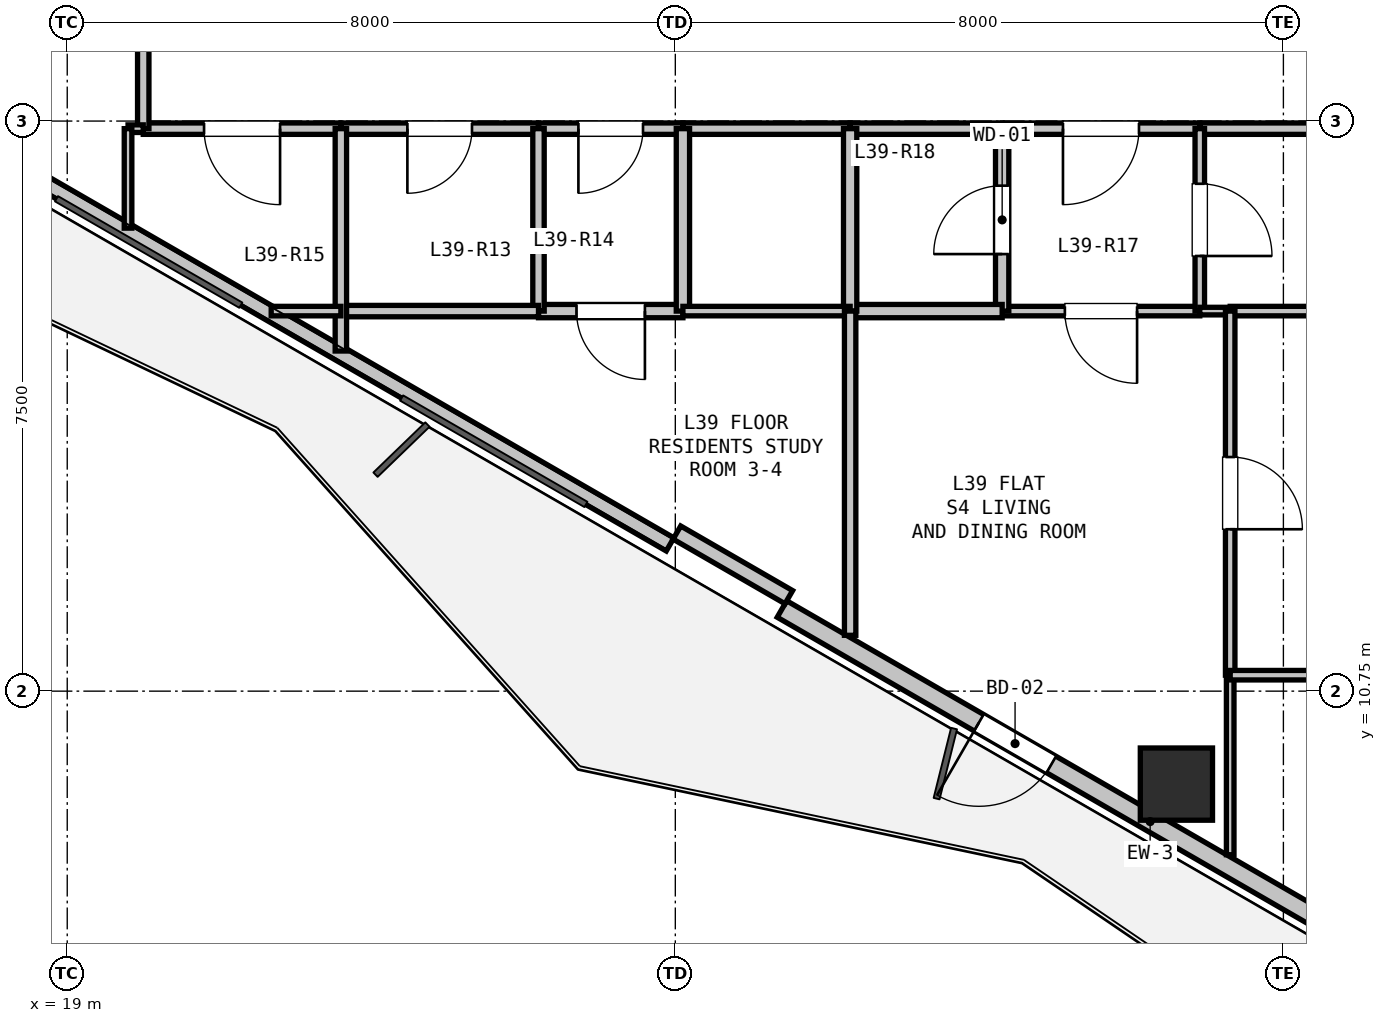
"""IFC4 building model, lengths in metres.
Left out: names, types, materials, properties, quantities, classifications, styles, units other than length and angle.
Written with IfcOpenShell. Run it as: python <this file> out.ifc"""

import sys

from ifc_helpers import new_model, si_unit, direction, frame, frame_2d, origin, origin_2d, place, context, subcontext, project, spatial, rectangle, hollow_rectangle, extrude, element, fill, save


model = new_model("IFC4")
c1 = context("Model", 3, precision=1e-05, world=origin(), true_north=direction((0.0, 1.0)))
c2 = subcontext(c1, "Body", "Model", "MODEL_VIEW")
j1 = project(units=[si_unit("LENGTHUNIT", "METRE"), si_unit("PLANEANGLEUNIT", "RADIAN")], contexts=[c1])
p1 = place(None, origin())
s1 = spatial("IfcSite", under=j1, at=p1, CompositionType="ELEMENT")
p2 = place(p1, origin())
s2 = spatial("IfcBuilding", under=s1, at=p2, CompositionType="ELEMENT")
p3 = place(p2, frame((0.0, 0.0, 141.0)))
s3 = spatial("IfcBuildingStorey", under=s2, at=p3, CompositionType="ELEMENT", Elevation=141.0)
p4 = place(p3, frame((33.593, 9.527, 0.0), z_axis=(0.0, 0.0, 1.0), x_axis=(1.0, 0.0, 0.0)))
e1 = element("IfcColumn", 1, at=p4, inside=s3, PredefinedType="COLUMN", context=c2, shape_type="SweptSolid", body=[
    extrude(hollow_rectangle(XDim=0.95, YDim=0.95, WallThickness=0.028, at=origin_2d()), origin(), (0.0, 0.0, 1.0), 3.3),
])
p5 = place(p3, frame((38.091, 6.237, 0.0), z_axis=(0.0, 0.0, 1.0), x_axis=(-0.86602239209, 0.500005216371, 0.0)))
e2 = element("IfcWall", 2, at=p5, inside=s3, PredefinedType="SOLIDWALL", context=c2, shape_type="SweptSolid", body=[
    extrude(rectangle(XDim=11.186, YDim=0.25, at=frame_2d((5.593, 0.0))), origin(), (0.0, 0.0, 1.0), 2.68),
])
p6 = place(p5, frame((7.095, 0.0, 0.0)))
e3 = element("IfcOpeningElement", 3, at=p6, cuts=e2, PredefinedType="OPENING", context=c2, shape_type="SweptSolid", body=[
    extrude(rectangle(XDim=1.1, YDim=2.1, at=frame_2d((0.55, 1.05))), frame((0.0, 0.135, 0.0), z_axis=(0.0, -1.0, 0.0), x_axis=(1.0, 0.0, 0.0)), (0.0, 0.0, 1.0), 0.27),
])
p7 = place(p5, frame((1.718, 0.0, 0.9)))
e4 = element("IfcOpeningElement", 4, at=p7, cuts=e2, PredefinedType="OPENING", context=c2, shape_type="SweptSolid", body=[
    extrude(rectangle(XDim=1.2, YDim=1.4, at=frame_2d((0.6, 0.7))), frame((0.0, 0.135, 0.0), z_axis=(0.0, -1.0, 0.0), x_axis=(1.0, 0.0, 0.0)), (0.0, 0.0, 1.0), 0.27),
])
p8 = place(p3, frame((26.931, 12.68, 0.0), z_axis=(0.0, 0.0, 1.0), x_axis=(-0.866026619769, 0.499997893847, 0.0)))
e5 = element("IfcWall", 5, at=p8, inside=s3, PredefinedType="PARAPET", context=c2, shape_type="SweptSolid", body=[
    extrude(rectangle(XDim=10.486, YDim=0.2, at=frame_2d((5.243, 0.0))), origin(), (0.0, 0.0, 1.0), 0.2),
])
p9 = place(p3, frame((28.493, 11.986, 0.0), z_axis=(0.0, 0.0, 1.0), x_axis=(-0.86605165483, 0.499954529098, 0.0)))
e6 = element("IfcWall", 6, at=p9, inside=s3, PredefinedType="PARAPET", context=c2, shape_type="SweptSolid", body=[
    extrude(rectangle(XDim=1.7, YDim=0.2, at=frame_2d((0.85, 0.0))), origin(), (0.0, 0.0, 1.0), 2.68),
])
p10 = place(p3, frame((39.2, 18.15, 0.0), z_axis=(0.0, 0.0, 1.0), x_axis=(-1.0, 0.0, 0.0)))
e7 = element("IfcWall", 7, at=p10, inside=s3, PredefinedType="PARTITIONING", context=c2, shape_type="SweptSolid", body=[
    extrude(rectangle(XDim=5.3, YDim=0.15, at=frame_2d((2.65, 0.0))), origin(), (0.0, 0.0, 1.0), 2.433),
])
p11 = place(p3, frame((33.9, 18.15, 0.0), z_axis=(0.0, 0.0, 1.0), x_axis=(-1.0, 0.0, 0.0)))
e8 = element("IfcWall", 8, at=p11, inside=s3, PredefinedType="PARTITIONING", context=c2, shape_type="SweptSolid", body=[
    extrude(rectangle(XDim=2.6, YDim=0.15, at=frame_2d((1.3, 0.0))), origin(), (0.0, 0.0, 1.0), 3.06),
])
p12 = place(p11, frame((0.8, 0.0, 0.0)))
e9 = element("IfcOpeningElement", 9, at=p12, cuts=e8, PredefinedType="OPENING", context=c2, shape_type="SweptSolid", body=[
    extrude(rectangle(XDim=1.0, YDim=2.15, at=frame_2d((0.5, 1.075))), frame((0.0, 0.085, 0.0), z_axis=(0.0, -1.0, 0.0), x_axis=(1.0, 0.0, 0.0)), (0.0, 0.0, 1.0), 0.17),
])
p13 = place(p3, frame((31.3, 18.15, 0.0), z_axis=(0.0, 0.0, 1.0), x_axis=(-1.0, 0.0, 0.0)))
e10 = element("IfcWall", 10, at=p13, inside=s3, PredefinedType="PARTITIONING", context=c2, shape_type="SweptSolid", body=[
    extrude(rectangle(XDim=2.0, YDim=0.15, at=frame_2d((1.0, 0.0))), origin(), (0.0, 0.0, 1.0), 3.06),
])
p14 = place(p3, frame((29.3, 18.15, 0.0), z_axis=(0.0, 0.0, 1.0), x_axis=(-1.0, 0.0, 0.0)))
e11 = element("IfcWall", 11, at=p14, inside=s3, PredefinedType="PARTITIONING", context=c2, shape_type="SweptSolid", body=[
    extrude(rectangle(XDim=2.2, YDim=0.15, at=frame_2d((1.1, 0.0))), origin(), (0.0, 0.0, 1.0), 3.06),
])
p15 = place(p3, frame((27.1, 18.15, 0.0), z_axis=(0.0, 0.0, 1.0), x_axis=(-1.0, 0.0, 0.0)))
e12 = element("IfcWall", 12, at=p15, inside=s3, PredefinedType="PARTITIONING", context=c2, shape_type="SweptSolid", body=[
    extrude(rectangle(XDim=1.9, YDim=0.15, at=frame_2d((0.95, 0.0))), origin(), (0.0, 0.0, 1.0), 3.06),
])
p16 = place(p15, frame((0.525, 0.0, 0.0)))
e13 = element("IfcOpeningElement", 13, at=p16, cuts=e12, PredefinedType="OPENING", context=c2, shape_type="SweptSolid", body=[
    extrude(rectangle(XDim=0.85, YDim=2.1, at=frame_2d((0.425, 1.05))), frame((0.0, 0.085, 0.0), z_axis=(0.0, -1.0, 0.0), x_axis=(1.0, 0.0, 0.0)), (0.0, 0.0, 1.0), 0.17),
])
p17 = place(p3, frame((25.2, 18.15, 0.0), z_axis=(0.0, 0.0, 1.0), x_axis=(-1.0, 0.0, 0.0)))
e14 = element("IfcWall", 14, at=p17, inside=s3, PredefinedType="PARTITIONING", context=c2, shape_type="SweptSolid", body=[
    extrude(rectangle(XDim=2.6, YDim=0.15, at=frame_2d((1.3, 0.0))), origin(), (0.0, 0.0, 1.0), 2.433),
])
p18 = place(p17, frame((0.875, 0.0, 0.0)))
e15 = element("IfcOpeningElement", 15, at=p18, cuts=e14, PredefinedType="OPENING", context=c2, shape_type="SweptSolid", body=[
    extrude(rectangle(XDim=0.85, YDim=2.1, at=frame_2d((0.425, 1.05))), frame((0.0, 0.085, 0.0), z_axis=(0.0, -1.0, 0.0), x_axis=(1.0, 0.0, 0.0)), (0.0, 0.0, 1.0), 0.17),
])
p19 = place(p3, frame((22.6, 18.15, 0.0), z_axis=(0.0, 0.0, 1.0), x_axis=(-1.0, 0.0, 0.0)))
e16 = element("IfcWall", 16, at=p19, inside=s3, PredefinedType="PARTITIONING", context=c2, shape_type="SweptSolid", body=[
    extrude(rectangle(XDim=2.6, YDim=0.15, at=frame_2d((1.3, 0.0))), origin(), (0.0, 0.0, 1.0), 3.06),
])
p20 = place(p19, frame((0.8, 0.0, 0.0)))
e17 = element("IfcOpeningElement", 17, at=p20, cuts=e16, PredefinedType="OPENING", context=c2, shape_type="SweptSolid", body=[
    extrude(rectangle(XDim=1.0, YDim=2.15, at=frame_2d((0.5, 1.075))), frame((0.0, 0.085, 0.0), z_axis=(0.0, -1.0, 0.0), x_axis=(1.0, 0.0, 0.0)), (0.0, 0.0, 1.0), 0.17),
])
p21 = place(p3, frame((20.0, 18.15, 0.0), z_axis=(0.0, 0.0, 1.0), x_axis=(0.0, 1.0, 0.0)))
e18 = element("IfcWall", 18, at=p21, inside=s3, PredefinedType="PARTITIONING", context=c2, shape_type="SweptSolid", body=[
    extrude(rectangle(XDim=2.6, YDim=0.15, at=frame_2d((1.3, 0.0))), origin(), (0.0, 0.0, 1.0), 3.06),
])
p22 = place(p3, frame((33.9, 15.75, 0.0), z_axis=(0.0, 0.0, 1.0), x_axis=(-1.0, 0.0, 0.0)))
e19 = element("IfcWall", 19, at=p22, inside=s3, PredefinedType="PARTITIONING", context=c2, shape_type="SweptSolid", body=[
    extrude(rectangle(XDim=2.6, YDim=0.125, at=frame_2d((1.3, 0.0))), origin(), (0.0, 0.0, 1.0), 3.06),
])
p23 = place(p22, frame((0.825, 0.0, 0.0)))
e20 = element("IfcOpeningElement", 20, at=p23, cuts=e19, PredefinedType="OPENING", context=c2, shape_type="SweptSolid", body=[
    extrude(rectangle(XDim=0.95, YDim=2.1, at=frame_2d((0.475, 1.05))), frame((0.0, 0.073, 0.0), z_axis=(0.0, -1.0, 0.0), x_axis=(1.0, 0.0, 0.0)), (0.0, 0.0, 1.0), 0.145),
])
p24 = place(p3, frame((31.3, 15.75, 0.0), z_axis=(0.0, 0.0, 1.0), x_axis=(0.0, 1.0, 0.0)))
e21 = element("IfcWall", 21, at=p24, inside=s3, PredefinedType="PLUMBINGWALL", context=c2, shape_type="SweptSolid", body=[
    extrude(rectangle(XDim=2.4, YDim=0.175, at=frame_2d((1.2, 0.0))), origin(), (0.0, 0.0, 1.0), 3.06),
])
p25 = place(p24, frame((0.75, 0.0, 0.0)))
e22 = element("IfcOpeningElement", 22, at=p25, cuts=e21, PredefinedType="OPENING", context=c2, shape_type="SweptSolid", body=[
    extrude(rectangle(XDim=0.9, YDim=2.1, at=frame_2d((0.45, 1.05))), frame((0.0, 0.097, 0.0), z_axis=(0.0, -1.0, 0.0), x_axis=(1.0, 0.0, 0.0)), (0.0, 0.0, 1.0), 0.195),
])
p26 = place(p3, frame((33.9, 18.15, 0.0), z_axis=(0.0, 0.0, 1.0), x_axis=(0.0, -1.0, 0.0)))
e23 = element("IfcWall", 23, at=p26, inside=s3, PredefinedType="PARTITIONING", context=c2, shape_type="SweptSolid", body=[
    extrude(rectangle(XDim=2.4, YDim=0.125, at=frame_2d((1.2, 0.0))), origin(), (0.0, 0.0, 1.0), 3.06),
])
p27 = place(p26, frame((0.725, 0.0, 0.0)))
e24 = element("IfcOpeningElement", 24, at=p27, cuts=e23, PredefinedType="OPENING", context=c2, shape_type="SweptSolid", body=[
    extrude(rectangle(XDim=0.95, YDim=2.1, at=frame_2d((0.475, 1.05))), frame((0.0, 0.073, 0.0), z_axis=(0.0, -1.0, 0.0), x_axis=(1.0, 0.0, 0.0)), (0.0, 0.0, 1.0), 0.145),
])
p28 = place(p3, frame((27.1, 15.75, 0.0), z_axis=(0.0, 0.0, 1.0), x_axis=(-1.0, 0.0, 0.0)))
e25 = element("IfcWall", 25, at=p28, inside=s3, PredefinedType="PLUMBINGWALL", context=c2, shape_type="SweptSolid", body=[
    extrude(rectangle(XDim=1.9, YDim=0.175, at=frame_2d((0.95, 0.0))), origin(), (0.0, 0.0, 1.0), 2.433),
])
p29 = place(p28, frame((0.5, 0.0, 0.0)))
e26 = element("IfcOpeningElement", 26, at=p29, cuts=e25, PredefinedType="OPENING", context=c2, shape_type="SweptSolid", body=[
    extrude(rectangle(XDim=0.9, YDim=2.1, at=frame_2d((0.45, 1.05))), frame((0.0, 0.097, 0.0), z_axis=(0.0, -1.0, 0.0), x_axis=(1.0, 0.0, 0.0)), (0.0, 0.0, 1.0), 0.195),
])
p30 = place(p3, frame((25.2, 15.75, 0.0), z_axis=(0.0, 0.0, 1.0), x_axis=(0.0, 1.0, 0.0)))
e27 = element("IfcWall", 27, at=p30, inside=s3, PredefinedType="PARTITIONING", context=c2, shape_type="SweptSolid", body=[
    extrude(rectangle(XDim=2.4, YDim=0.15, at=frame_2d((1.2, 0.0))), origin(), (0.0, 0.0, 1.0), 2.433),
])
p31 = place(p3, frame((27.1, 18.15, 0.0), z_axis=(0.0, 0.0, 1.0), x_axis=(0.0, -1.0, 0.0)))
e28 = element("IfcWall", 28, at=p31, inside=s3, PredefinedType="PLUMBINGWALL", context=c2, shape_type="SweptSolid", body=[
    extrude(rectangle(XDim=2.4, YDim=0.175, at=frame_2d((1.2, 0.0))), origin(), (0.0, 0.0, 1.0), 2.433),
])
p32 = place(p3, frame((31.3, 15.75, 0.0), z_axis=(0.0, 0.0, 1.0), x_axis=(-1.0, 0.0, 0.0)))
e29 = element("IfcWall", 29, at=p32, inside=s3, PredefinedType="PLUMBINGWALL", context=c2, shape_type="SweptSolid", body=[
    extrude(rectangle(XDim=2.0, YDim=0.175, at=frame_2d((1.0, 0.0))), origin(), (0.0, 0.0, 1.0), 3.06),
])
p33 = place(p3, frame((29.3, 15.75, 0.0), z_axis=(0.0, 0.0, 1.0), x_axis=(0.0, 1.0, 0.0)))
e30 = element("IfcWall", 30, at=p33, inside=s3, PredefinedType="PLUMBINGWALL", context=c2, shape_type="SweptSolid", body=[
    extrude(rectangle(XDim=2.4, YDim=0.175, at=frame_2d((1.2, 0.0))), origin(), (0.0, 0.0, 1.0), 3.06),
])
p34 = place(p3, frame((42.07, 15.75, 0.0), z_axis=(0.0, 0.0, 1.0), x_axis=(-1.0, 0.0, 0.0)))
e31 = element("IfcWall", 31, at=p34, inside=s3, PredefinedType="PARTITIONING", context=c2, shape_type="SweptSolid", body=[
    extrude(rectangle(XDim=7.77, YDim=0.125, at=frame_2d((3.885, 0.0))), origin(), (0.0, 0.0, 1.0), 2.365),
])
p35 = place(p34, frame((3.41, 0.0, 0.0)))
e32 = element("IfcOpeningElement", 32, at=p35, cuts=e31, PredefinedType="OPENING", context=c2, shape_type="SweptSolid", body=[
    extrude(rectangle(XDim=0.95, YDim=2.1, at=frame_2d((0.475, 1.05))), frame((0.0, 0.073, 0.0), z_axis=(0.0, -1.0, 0.0), x_axis=(1.0, 0.0, 0.0)), (0.0, 0.0, 1.0), 0.145),
])
p36 = place(p3, frame((34.3, 15.75, 0.0), z_axis=(0.0, 0.0, 1.0), x_axis=(-1.0, 0.0, 0.0)))
e33 = element("IfcWall", 33, at=p36, inside=s3, PredefinedType="PARTITIONING", context=c2, shape_type="SweptSolid", body=[
    extrude(rectangle(XDim=0.4, YDim=0.1, at=frame_2d((0.2, 0.0))), origin(), (0.0, 0.0, 1.0), 3.06),
])
p37 = place(p3, frame((25.2, 15.75, 0.0), z_axis=(0.0, 0.0, 1.0), x_axis=(-1.0, 0.0, 0.0)))
e34 = element("IfcWall", 34, at=p37, inside=s3, PredefinedType="PARTITIONING", context=c2, shape_type="SweptSolid", body=[
    extrude(rectangle(XDim=2.6, YDim=0.15, at=frame_2d((1.3, 0.0))), origin(), (0.0, 0.0, 1.0), 2.365),
])
p38 = place(p3, frame((22.6, 15.225, 0.0), z_axis=(0.0, 0.0, 1.0), x_axis=(0.0, 1.0, 0.0)))
e35 = element("IfcWall", 35, at=p38, inside=s3, PredefinedType="PARTITIONING", context=c2, shape_type="SweptSolid", body=[
    extrude(rectangle(XDim=2.925, YDim=0.15, at=frame_2d((1.463, 0.0))), origin(), (0.0, 0.0, 1.0), 2.365),
])
p39 = place(p3, frame((19.8, 18.15, 0.0), z_axis=(0.0, 0.0, 1.0), x_axis=(1.0, 0.0, 0.0)))
e36 = element("IfcWall", 36, at=p39, inside=s3, PredefinedType="PARTITIONING", context=c2, shape_type="SweptSolid", body=[
    extrude(rectangle(XDim=0.2, YDim=0.1, at=frame_2d((0.1, 0.0))), origin(), (0.0, 0.0, 1.0), 3.06),
])
p40 = place(p3, frame((22.6, 15.75, 0.0), z_axis=(0.0, 0.0, 1.0), x_axis=(-1.0, 0.0, 0.0)))
e37 = element("IfcWall", 37, at=p40, inside=s3, PredefinedType="PARTITIONING", context=c2, shape_type="SweptSolid", body=[
    extrude(rectangle(XDim=0.917, YDim=0.125, at=frame_2d((0.458, 0.0))), origin(), (0.0, 0.0, 1.0), 2.365),
])
p41 = place(p3, frame((19.8, 16.841, 0.0), z_axis=(0.0, 0.0, 1.0), x_axis=(0.0, 1.0, 0.0)))
e38 = element("IfcWall", 38, at=p41, inside=s3, PredefinedType="PARTITIONING", context=c2, shape_type="SweptSolid", body=[
    extrude(rectangle(XDim=1.309, YDim=0.1, at=frame_2d((0.654, 0.0))), origin(), (0.0, 0.0, 1.0), 2.365),
])
p42 = place(p3, frame((27.1, 15.75, 0.0), z_axis=(0.0, 0.0, 1.0), x_axis=(1.0, 0.0, 0.0)))
e39 = element("IfcWall", 39, at=p42, inside=s3, PredefinedType="PARTITIONING", context=c2, shape_type="SweptSolid", body=[
    extrude(rectangle(XDim=2.2, YDim=0.125, at=frame_2d((1.1, 0.0))), origin(), (0.0, 0.0, 1.0), 2.433),
])
p43 = place(p3, frame((29.3, 15.75, 0.0), z_axis=(0.0, 0.0, 1.0), x_axis=(0.0, -1.0, 0.0)))
e40 = element("IfcWall", 40, at=p43, inside=s3, PredefinedType="PARTITIONING", context=c2, shape_type="SweptSolid", body=[
    extrude(rectangle(XDim=4.265, YDim=0.15, at=frame_2d((2.133, 0.0))), origin(), (0.0, 0.0, 1.0), 2.365),
])
p44 = place(p3, frame((34.3, 15.75, 0.0), z_axis=(0.0, 0.0, 1.0), x_axis=(0.0, -1.0, 0.0)))
e41 = element("IfcWall", 41, at=p44, inside=s3, PredefinedType="PARTITIONING", context=c2, shape_type="SweptSolid", body=[
    extrude(rectangle(XDim=4.79, YDim=0.125, at=frame_2d((2.395, 0.0))), origin(), (0.0, 0.0, 1.0), 3.06),
])
p45 = place(p44, frame((1.92, 0.0, 0.0)))
e42 = element("IfcOpeningElement", 42, at=p45, cuts=e41, PredefinedType="OPENING", context=c2, shape_type="SweptSolid", body=[
    extrude(rectangle(XDim=0.95, YDim=2.1, at=frame_2d((0.475, 1.05))), frame((0.0, 0.073, 0.0), z_axis=(0.0, -1.0, 0.0), x_axis=(1.0, 0.0, 0.0)), (0.0, 0.0, 1.0), 0.145),
])
p46 = place(p3, frame((34.3, 10.96, 0.0), z_axis=(0.0, 0.0, 1.0), x_axis=(0.0, -1.0, 0.0)))
e43 = element("IfcWall", 43, at=p46, inside=s3, PredefinedType="PARTITIONING", context=c2, shape_type="SweptSolid", body=[
    extrude(rectangle(XDim=2.362, YDim=0.1, at=frame_2d((1.181, 0.0))), origin(), (0.0, 0.0, 1.0), 2.725),
])
p47 = place(p3, frame((34.3, 10.96, 0.0), z_axis=(0.0, 0.0, 1.0), x_axis=(1.0, 0.0, 0.0)))
e44 = element("IfcWall", 44, at=p47, inside=s3, PredefinedType="PARTITIONING", context=c2, shape_type="SweptSolid", body=[
    extrude(rectangle(XDim=7.77, YDim=0.125, at=frame_2d((3.885, 0.0))), origin(), (0.0, 0.0, 1.0), 2.433),
])
p48 = place(p47, frame((3.41, 0.0, 0.0)))
e45 = element("IfcOpeningElement", 45, at=p48, cuts=e44, PredefinedType="OPENING", context=c2, shape_type="SweptSolid", body=[
    extrude(rectangle(XDim=0.95, YDim=2.1, at=frame_2d((0.475, 1.05))), frame((0.0, 0.073, 0.0), z_axis=(0.0, -1.0, 0.0), x_axis=(1.0, 0.0, 0.0)), (0.0, 0.0, 1.0), 0.145),
])
p49 = place(p6, origin())
e46 = element("IfcDoor", 46, at=p49, inside=s3, OperationType="SINGLE_SWING_RIGHT", PredefinedType="DOOR", context=c2, shape_type="SweptSolid", body=[
    extrude(rectangle(XDim=1.1, YDim=2.1, at=frame_2d((0.55, 1.05))), frame((0.0, 0.025, 0.0), z_axis=(0.0, -1.0, 0.0), x_axis=(1.0, 0.0, 0.0)), (0.0, 0.0, 1.0), 0.05),
])
fill(e3, e46)
p50 = place(p12, origin())
e47 = element("IfcDoor", 47, at=p50, inside=s3, OperationType="SINGLE_SWING_RIGHT", PredefinedType="DOOR", context=c2, shape_type="SweptSolid", body=[
    extrude(rectangle(XDim=1.0, YDim=2.15, at=frame_2d((0.5, 1.075))), frame((0.0, 0.025, 0.0), z_axis=(0.0, -1.0, 0.0), x_axis=(1.0, 0.0, 0.0)), (0.0, 0.0, 1.0), 0.05),
])
fill(e9, e47)
p51 = place(p16, origin())
e48 = element("IfcDoor", 48, at=p51, inside=s3, OperationType="SINGLE_SWING_RIGHT", PredefinedType="DOOR", context=c2, shape_type="SweptSolid", body=[
    extrude(rectangle(XDim=0.85, YDim=2.1, at=frame_2d((0.425, 1.05))), frame((0.0, 0.025, 0.0), z_axis=(0.0, -1.0, 0.0), x_axis=(1.0, 0.0, 0.0)), (0.0, 0.0, 1.0), 0.05),
])
fill(e13, e48)
p52 = place(p18, origin())
e49 = element("IfcDoor", 49, at=p52, inside=s3, OperationType="SINGLE_SWING_RIGHT", PredefinedType="DOOR", context=c2, shape_type="SweptSolid", body=[
    extrude(rectangle(XDim=0.85, YDim=2.1, at=frame_2d((0.425, 1.05))), frame((0.0, 0.025, 0.0), z_axis=(0.0, -1.0, 0.0), x_axis=(1.0, 0.0, 0.0)), (0.0, 0.0, 1.0), 0.05),
])
fill(e15, e49)
p53 = place(p20, origin())
e50 = element("IfcDoor", 50, at=p53, inside=s3, OperationType="SINGLE_SWING_LEFT", PredefinedType="DOOR", context=c2, shape_type="SweptSolid", body=[
    extrude(rectangle(XDim=1.0, YDim=2.15, at=frame_2d((0.5, 1.075))), frame((0.0, 0.025, 0.0), z_axis=(0.0, -1.0, 0.0), x_axis=(1.0, 0.0, 0.0)), (0.0, 0.0, 1.0), 0.05),
])
fill(e17, e50)
p54 = place(p25, origin())
e51 = element("IfcDoor", 51, at=p54, inside=s3, OperationType="SINGLE_SWING_LEFT", PredefinedType="DOOR", context=c2, shape_type="SweptSolid", body=[
    extrude(rectangle(XDim=0.9, YDim=2.1, at=frame_2d((0.45, 1.05))), frame((0.0, 0.025, 0.0), z_axis=(0.0, -1.0, 0.0), x_axis=(1.0, 0.0, 0.0)), (0.0, 0.0, 1.0), 0.05),
])
fill(e22, e51)
p55 = place(p27, origin())
e52 = element("IfcDoor", 52, at=p55, inside=s3, OperationType="SINGLE_SWING_RIGHT", PredefinedType="DOOR", context=c2, shape_type="SweptSolid", body=[
    extrude(rectangle(XDim=0.95, YDim=2.1, at=frame_2d((0.475, 1.05))), frame((0.0, 0.025, 0.0), z_axis=(0.0, -1.0, 0.0), x_axis=(1.0, 0.0, 0.0)), (0.0, 0.0, 1.0), 0.05),
])
fill(e24, e52)
p56 = place(p23, origin())
e53 = element("IfcDoor", 53, at=p56, inside=s3, OperationType="SINGLE_SWING_LEFT", PredefinedType="DOOR", context=c2, shape_type="SweptSolid", body=[
    extrude(rectangle(XDim=0.95, YDim=2.1, at=frame_2d((0.475, 1.05))), frame((0.0, 0.025, 0.0), z_axis=(0.0, -1.0, 0.0), x_axis=(1.0, 0.0, 0.0)), (0.0, 0.0, 1.0), 0.05),
])
fill(e20, e53)
p57 = place(p45, origin())
e54 = element("IfcDoor", 54, at=p57, inside=s3, OperationType="SINGLE_SWING_RIGHT", PredefinedType="DOOR", context=c2, shape_type="SweptSolid", body=[
    extrude(rectangle(XDim=0.95, YDim=2.1, at=frame_2d((0.475, 1.05))), frame((0.0, 0.025, 0.0), z_axis=(0.0, -1.0, 0.0), x_axis=(1.0, 0.0, 0.0)), (0.0, 0.0, 1.0), 0.05),
])
fill(e42, e54)
p58 = place(p29, origin())
e55 = element("IfcDoor", 55, at=p58, inside=s3, OperationType="SINGLE_SWING_LEFT", PredefinedType="DOOR", context=c2, shape_type="SweptSolid", body=[
    extrude(rectangle(XDim=0.9, YDim=2.1, at=frame_2d((0.45, 1.05))), frame((0.0, 0.025, 0.0), z_axis=(0.0, -1.0, 0.0), x_axis=(1.0, 0.0, 0.0)), (0.0, 0.0, 1.0), 0.05),
])
fill(e26, e55)
save(model, sys.argv[1])
